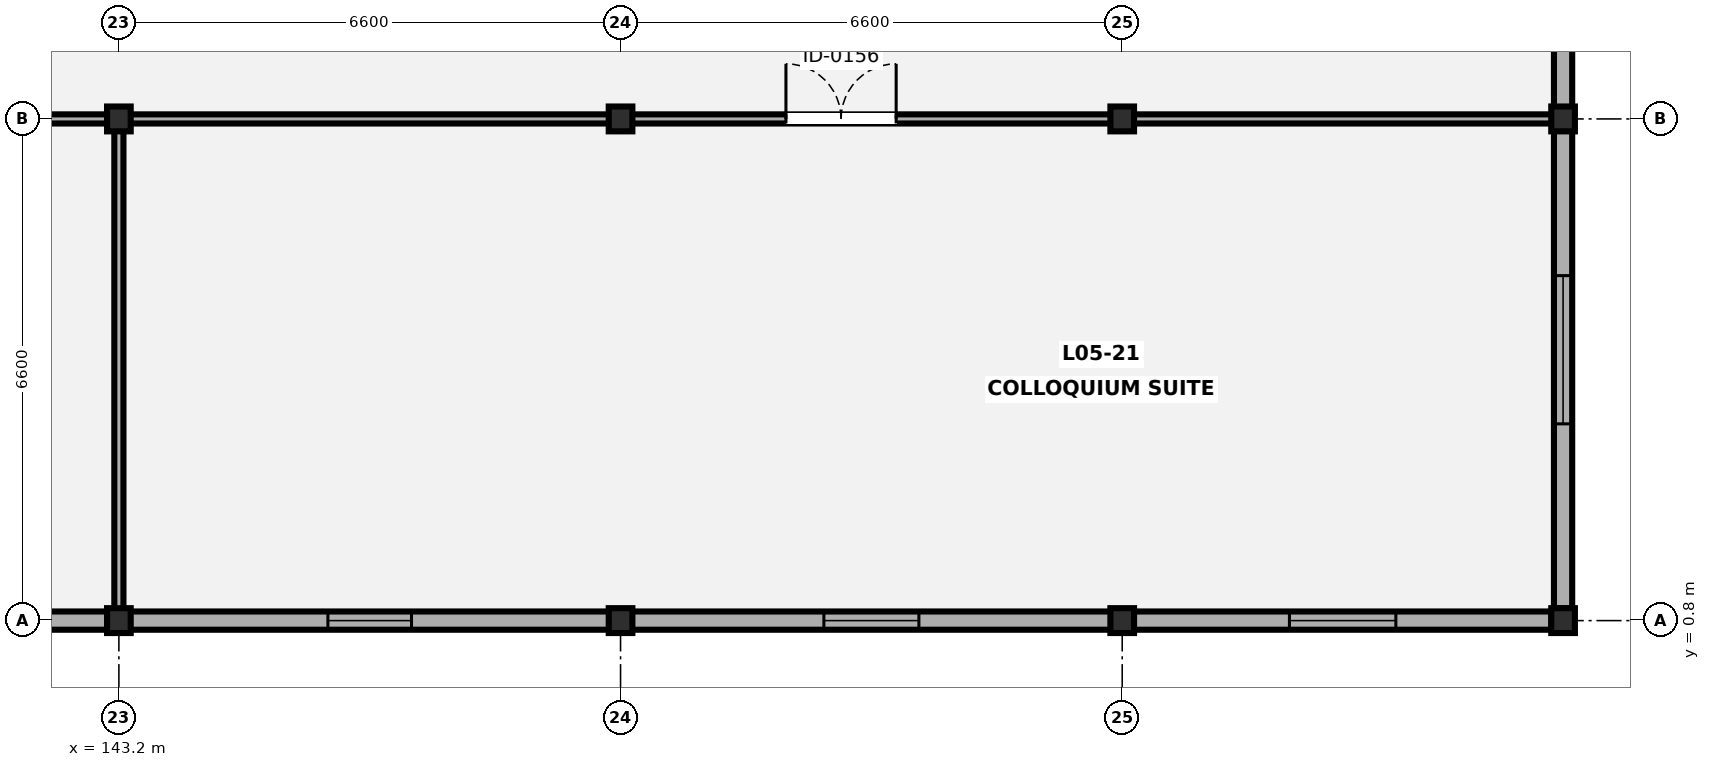
"""IFC4 building model, lengths in metres.
Left out: names, types, materials, properties, quantities, classifications, styles, units other than length and angle.
Written with IfcOpenShell. Run it as: python <this file> out.ifc"""

import sys

from ifc_helpers import new_model, si_unit, direction, frame, frame_2d, origin, origin_2d, place, context, subcontext, project, spatial, rectangle, i_section, extrude, element, fill, save


model = new_model("IFC4")
c1 = context("Model", 3, precision=1e-05, world=origin(), true_north=direction((0.0, 1.0)))
c2 = subcontext(c1, "Body", "Model", "MODEL_VIEW")
j1 = project(units=[si_unit("LENGTHUNIT", "METRE"), si_unit("PLANEANGLEUNIT", "RADIAN")], contexts=[c1])
p1 = place(None, origin())
s1 = spatial("IfcSite", under=j1, at=p1, CompositionType="ELEMENT")
p2 = place(p1, origin())
s2 = spatial("IfcBuilding", under=s1, at=p2, CompositionType="ELEMENT")
p3 = place(p2, frame((0.0, 0.0, 21.7)))
s3 = spatial("IfcBuildingStorey", under=s2, at=p3, CompositionType="ELEMENT", Elevation=21.7)
for number, where, z_axis, x_axis in (
    (1, (143.2, 0.8, 0.0), (0.0, 0.0, 1.0), (1.0, 0.0, 0.0)),
    (2, (143.2, 7.4, 0.0), (0.0, 0.0, 1.0), (1.0, 0.0, 0.0)),
    (3, (149.8, 0.8, 0.0), (0.0, 0.0, 1.0), (1.0, 0.0, 0.0)),
    (4, (149.8, 7.4, 0.0), (0.0, 0.0, 1.0), (1.0, 0.0, 0.0)),
    (5, (156.4, 0.8, 0.0), (0.0, 0.0, 1.0), (1.0, 0.0, 0.0)),
    (6, (156.4, 7.4, 0.0), (0.0, 0.0, 1.0), (1.0, 0.0, 0.0)),
):
    element("IfcColumn", number, at=place(p3, frame(where, z_axis=z_axis, x_axis=x_axis)), inside=s3, PredefinedType="COLUMN", context=c2, shape_type="SweptSolid", body=[
        extrude(i_section(OverallWidth=0.311, OverallDepth=0.327, WebThickness=0.016, FlangeThickness=0.025, FilletRadius=0.017, at=origin_2d()), origin(), (0.0, 0.0, 1.0), 4.2),
    ])
for number, where, z_axis, x_axis in (
    (7, (162.2, 0.8, 0.0), (0.0, 0.0, 1.0), (1.0, 0.0, 0.0)),
    (8, (162.2, 7.4, 0.0), (0.0, 0.0, 1.0), (1.0, 0.0, 0.0)),
):
    element("IfcColumn", number, at=place(p3, frame(where, z_axis=z_axis, x_axis=x_axis)), inside=s3, PredefinedType="COLUMN", context=c2, shape_type="SweptSolid", body=[
        extrude(i_section(OverallWidth=0.311, OverallDepth=0.327, WebThickness=0.016, FlangeThickness=0.025, FilletRadius=0.017, at=origin_2d()), origin(), (0.0, 0.0, 1.0), 3.92),
    ])
p4 = place(p3, frame((162.2, 20.438, 0.0), z_axis=(0.0, 0.0, 1.0), x_axis=(0.0, -1.0, 0.0)))
e9 = element("IfcWall", 9, at=p4, inside=s3, PredefinedType="SOLIDWALL", context=c2, shape_type="SweptSolid", body=[
    extrude(rectangle(XDim=19.477, YDim=0.24, at=frame_2d((9.739, 0.0))), origin(), (0.0, 0.0, 1.0), 3.372),
])
p5 = place(p4, frame((2.4, 0.0, 0.85)))
e10 = element("IfcOpeningElement", 10, at=p5, cuts=e9, PredefinedType="OPENING", context=c2, shape_type="SweptSolid", body=[
    extrude(rectangle(XDim=1.55, YDim=1.4, at=frame_2d((0.775, 0.7))), frame((0.0, 0.13, 0.0), z_axis=(0.0, -1.0, 0.0), x_axis=(1.0, 0.0, 0.0)), (0.0, 0.0, 1.0), 0.26),
])
p6 = place(p4, frame((15.1, 0.0, 0.85)))
e11 = element("IfcOpeningElement", 11, at=p6, cuts=e9, PredefinedType="OPENING", context=c2, shape_type="SweptSolid", body=[
    extrude(rectangle(XDim=1.95, YDim=1.5, at=frame_2d((0.975, 0.75))), frame((0.0, 0.13, 0.0), z_axis=(0.0, -1.0, 0.0), x_axis=(1.0, 0.0, 0.0)), (0.0, 0.0, 1.0), 0.26),
])
p7 = place(p3, frame((162.046, 0.8, 0.0), z_axis=(0.0, 0.0, 1.0), x_axis=(-1.0, 0.0, 0.0)))
e12 = element("IfcWall", 12, at=p7, inside=s3, PredefinedType="SOLIDWALL", context=c2, shape_type="SweptSolid", body=[
    extrude(rectangle(XDim=58.293, YDim=0.24, at=frame_2d((29.146, 0.0))), origin(), (0.0, 0.0, 1.0), 3.505),
])
p8 = place(p7, frame((54.471, 0.0, 0.85)))
e13 = element("IfcOpeningElement", 13, at=p8, cuts=e12, PredefinedType="OPENING", context=c2, shape_type="SweptSolid", body=[
    extrude(rectangle(XDim=1.35, YDim=1.5, at=frame_2d((0.675, 0.75))), frame((0.0, 0.13, 0.0), z_axis=(0.0, -1.0, 0.0), x_axis=(1.0, 0.0, 0.0)), (0.0, 0.0, 1.0), 0.26),
])
p9 = place(p7, frame((47.747, 0.0, 0.85)))
e14 = element("IfcOpeningElement", 14, at=p9, cuts=e12, PredefinedType="OPENING", context=c2, shape_type="SweptSolid", body=[
    extrude(rectangle(XDim=1.6, YDim=1.5, at=frame_2d((0.8, 0.75))), frame((0.0, 0.13, 0.0), z_axis=(0.0, -1.0, 0.0), x_axis=(1.0, 0.0, 0.0)), (0.0, 0.0, 1.0), 0.26),
])
p10 = place(p7, frame((40.971, 0.0, 0.85)))
e15 = element("IfcOpeningElement", 15, at=p10, cuts=e12, PredefinedType="OPENING", context=c2, shape_type="SweptSolid", body=[
    extrude(rectangle(XDim=1.95, YDim=1.5, at=frame_2d((0.975, 0.75))), frame((0.0, 0.13, 0.0), z_axis=(0.0, -1.0, 0.0), x_axis=(1.0, 0.0, 0.0)), (0.0, 0.0, 1.0), 0.26),
])
p11 = place(p7, frame((34.171, 0.0, 0.85)))
e16 = element("IfcOpeningElement", 16, at=p11, cuts=e12, PredefinedType="OPENING", context=c2, shape_type="SweptSolid", body=[
    extrude(rectangle(XDim=2.35, YDim=1.5, at=frame_2d((1.175, 0.75))), frame((0.0, 0.13, 0.0), z_axis=(0.0, -1.0, 0.0), x_axis=(1.0, 0.0, 0.0)), (0.0, 0.0, 1.0), 0.26),
])
p12 = place(p7, frame((27.396, 0.0, 0.85)))
e17 = element("IfcOpeningElement", 17, at=p12, cuts=e12, PredefinedType="OPENING", context=c2, shape_type="SweptSolid", body=[
    extrude(rectangle(XDim=2.7, YDim=1.35, at=frame_2d((1.35, 0.675))), frame((0.0, 0.13, 0.0), z_axis=(0.0, -1.0, 0.0), x_axis=(1.0, 0.0, 0.0)), (0.0, 0.0, 1.0), 0.26),
])
p13 = place(p7, frame((20.697, 0.0, 0.85)))
e18 = element("IfcOpeningElement", 18, at=p13, cuts=e12, PredefinedType="OPENING", context=c2, shape_type="SweptSolid", body=[
    extrude(rectangle(XDim=2.9, YDim=1.35, at=frame_2d((1.45, 0.675))), frame((0.0, 0.13, 0.0), z_axis=(0.0, -1.0, 0.0), x_axis=(1.0, 0.0, 0.0)), (0.0, 0.0, 1.0), 0.26),
])
p14 = place(p7, frame((14.997, 0.0, 0.85)))
e19 = element("IfcOpeningElement", 19, at=p14, cuts=e12, PredefinedType="OPENING", context=c2, shape_type="SweptSolid", body=[
    extrude(rectangle(XDim=1.1, YDim=1.4, at=frame_2d((0.55, 0.7))), frame((0.0, 0.13, 0.0), z_axis=(0.0, -1.0, 0.0), x_axis=(1.0, 0.0, 0.0)), (0.0, 0.0, 1.0), 0.26),
])
p15 = place(p7, frame((8.322, 0.0, 0.85)))
e20 = element("IfcOpeningElement", 20, at=p15, cuts=e12, PredefinedType="OPENING", context=c2, shape_type="SweptSolid", body=[
    extrude(rectangle(XDim=1.25, YDim=1.4, at=frame_2d((0.625, 0.7))), frame((0.0, 0.13, 0.0), z_axis=(0.0, -1.0, 0.0), x_axis=(1.0, 0.0, 0.0)), (0.0, 0.0, 1.0), 0.26),
])
p16 = place(p7, frame((2.046, 0.0, 0.85)))
e21 = element("IfcOpeningElement", 21, at=p16, cuts=e12, PredefinedType="OPENING", context=c2, shape_type="SweptSolid", body=[
    extrude(rectangle(XDim=1.4, YDim=1.4, at=frame_2d((0.7, 0.7))), frame((0.0, 0.13, 0.0), z_axis=(0.0, -1.0, 0.0), x_axis=(1.0, 0.0, 0.0)), (0.0, 0.0, 1.0), 0.26),
])
p17 = place(p3, frame((136.6, 7.4, 0.0), z_axis=(0.0, 0.0, 1.0), x_axis=(1.0, 0.0, 0.0)))
e22 = element("IfcWall", 22, at=p17, inside=s3, PredefinedType="PARTITIONING", context=c2, shape_type="SweptSolid", body=[
    extrude(rectangle(XDim=6.6, YDim=0.12, at=frame_2d((3.3, 0.0))), origin(), (0.0, 0.0, 1.0), 3.293),
])
p18 = place(p17, frame((2.5, 0.0, 0.0)))
e23 = element("IfcOpeningElement", 23, at=p18, cuts=e22, PredefinedType="OPENING", context=c2, shape_type="SweptSolid", body=[
    extrude(rectangle(XDim=1.6, YDim=2.18, at=frame_2d((0.8, 1.09))), frame((0.0, 0.07, 0.0), z_axis=(0.0, -1.0, 0.0), x_axis=(1.0, 0.0, 0.0)), (0.0, 0.0, 1.0), 0.14),
])
p19 = place(p3, frame((143.2, 0.8, 0.0), z_axis=(0.0, 0.0, 1.0), x_axis=(0.0, 1.0, 0.0)))
e24 = element("IfcWall", 24, at=p19, inside=s3, PredefinedType="PARTITIONING", context=c2, shape_type="SweptSolid", body=[
    extrude(rectangle(XDim=6.6, YDim=0.12, at=frame_2d((3.3, 0.0))), origin(), (0.0, 0.0, 1.0), 3.372),
])
p20 = place(p3, frame((143.202, 7.4, 0.0), z_axis=(0.0, 0.0, 1.0), x_axis=(1.0, 0.0, 0.0)))
e25 = element("IfcWall", 25, at=p20, inside=s3, PredefinedType="PARTITIONING", context=c2, shape_type="SweptSolid", body=[
    extrude(rectangle(XDim=18.998, YDim=0.12, at=frame_2d((9.499, 0.0))), origin(), (0.0, 0.0, 1.0), 3.293),
])
p21 = place(p20, frame((8.774, 0.0, 0.0)))
e26 = element("IfcOpeningElement", 26, at=p21, cuts=e25, PredefinedType="OPENING", context=c2, shape_type="SweptSolid", body=[
    extrude(rectangle(XDim=1.45, YDim=2.12, at=frame_2d((0.725, 1.06))), frame((0.0, 0.07, 0.0), z_axis=(0.0, -1.0, 0.0), x_axis=(1.0, 0.0, 0.0)), (0.0, 0.0, 1.0), 0.14),
])
p22 = place(p6, origin())
e27 = element("IfcWindow", 27, at=p22, inside=s3, PartitioningType="SINGLE_PANEL", PredefinedType="WINDOW", context=c2, shape_type="SweptSolid", body=[
    extrude(rectangle(XDim=1.95, YDim=1.5, at=frame_2d((0.975, 0.75))), frame((0.0, 0.03, 0.0), z_axis=(0.0, -1.0, 0.0), x_axis=(1.0, 0.0, 0.0)), (0.0, 0.0, 1.0), 0.06),
])
fill(e11, e27)
p23 = place(p14, origin())
e28 = element("IfcWindow", 28, at=p23, inside=s3, PartitioningType="SINGLE_PANEL", PredefinedType="WINDOW", context=c2, shape_type="SweptSolid", body=[
    extrude(rectangle(XDim=1.1, YDim=1.4, at=frame_2d((0.55, 0.7))), frame((0.0, 0.03, 0.0), z_axis=(0.0, -1.0, 0.0), x_axis=(1.0, 0.0, 0.0)), (0.0, 0.0, 1.0), 0.06),
])
fill(e19, e28)
p24 = place(p15, origin())
e29 = element("IfcWindow", 29, at=p24, inside=s3, PartitioningType="SINGLE_PANEL", PredefinedType="WINDOW", context=c2, shape_type="SweptSolid", body=[
    extrude(rectangle(XDim=1.25, YDim=1.4, at=frame_2d((0.625, 0.7))), frame((0.0, 0.03, 0.0), z_axis=(0.0, -1.0, 0.0), x_axis=(1.0, 0.0, 0.0)), (0.0, 0.0, 1.0), 0.06),
])
fill(e20, e29)
p25 = place(p16, origin())
e30 = element("IfcWindow", 30, at=p25, inside=s3, PartitioningType="SINGLE_PANEL", PredefinedType="WINDOW", context=c2, shape_type="SweptSolid", body=[
    extrude(rectangle(XDim=1.4, YDim=1.4, at=frame_2d((0.7, 0.7))), frame((0.0, 0.03, 0.0), z_axis=(0.0, -1.0, 0.0), x_axis=(1.0, 0.0, 0.0)), (0.0, 0.0, 1.0), 0.06),
])
fill(e21, e30)
p26 = place(p21, origin())
e31 = element("IfcDoor", 31, at=p26, inside=s3, OperationType="DOUBLE_DOOR_SINGLE_SWING", PredefinedType="DOOR", context=c2, shape_type="SweptSolid", body=[
    extrude(rectangle(XDim=1.45, YDim=2.12, at=frame_2d((0.725, 1.06))), frame((0.0, 0.025, 0.0), z_axis=(0.0, -1.0, 0.0), x_axis=(1.0, 0.0, 0.0)), (0.0, 0.0, 1.0), 0.05),
])
fill(e26, e31)
save(model, sys.argv[1])
